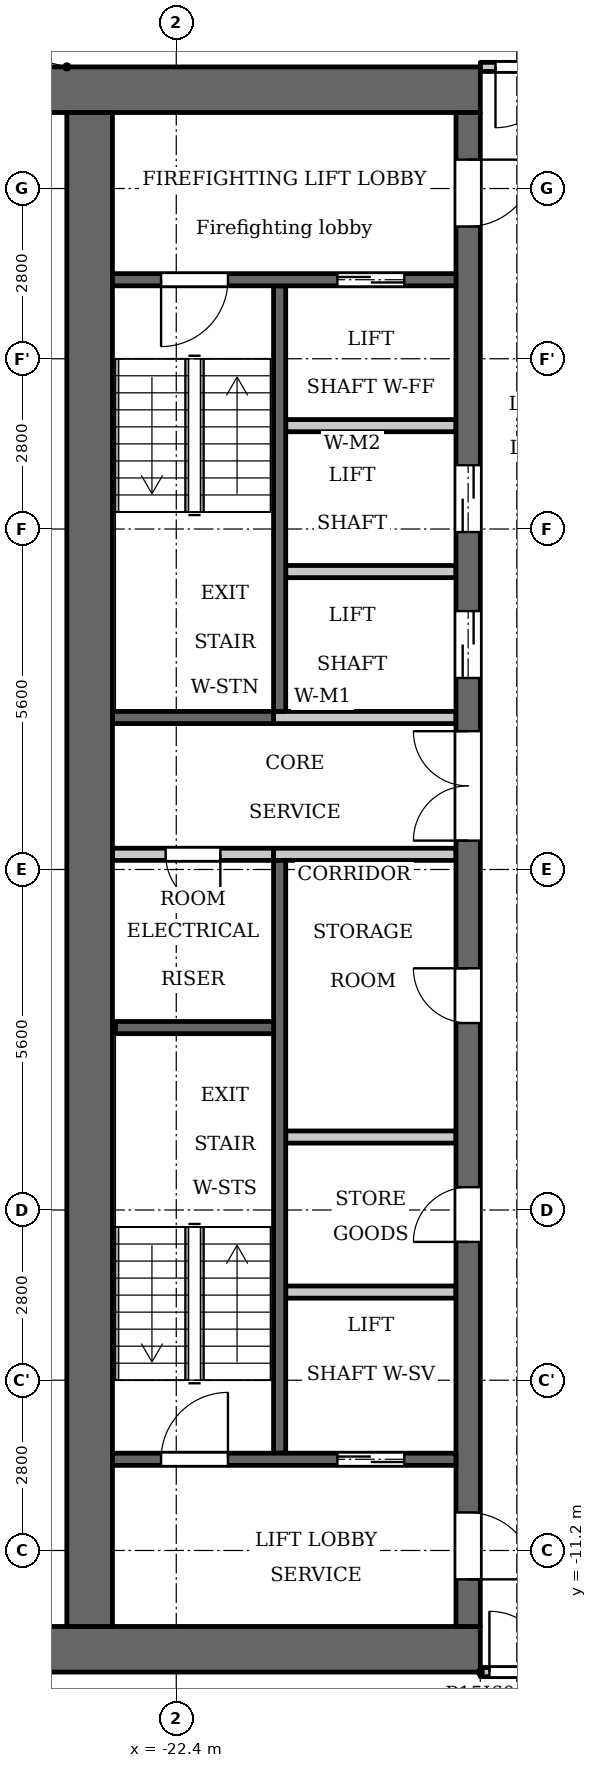
"""IFC4 building model, lengths in metres.
Left out: names, types, materials, properties, quantities, classifications, styles, units other than length and angle.
Written with IfcOpenShell. Run it as: python <this file> out.ifc"""

import sys

from ifc_helpers import new_model, si_unit, direction, frame, frame_2d, origin, place, context, subcontext, project, spatial, rectangle, extrude, element, fill, save


model = new_model("IFC4")
c1 = context("Model", 3, precision=1e-05, world=origin(), true_north=direction((0.0, 1.0)))
c2 = subcontext(c1, "Body", "Model", "MODEL_VIEW")
j1 = project(units=[si_unit("LENGTHUNIT", "METRE"), si_unit("PLANEANGLEUNIT", "RADIAN")], contexts=[c1])
p1 = place(None, origin())
s1 = spatial("IfcSite", under=j1, at=p1, CompositionType="ELEMENT")
p2 = place(p1, origin())
s2 = spatial("IfcBuilding", under=s1, at=p2, CompositionType="ELEMENT")
p3 = place(p2, frame((0.0, 0.0, 188.9)))
s3 = spatial("IfcBuildingStorey", under=s2, at=p3, CompositionType="ELEMENT", Elevation=188.9)
p4 = place(p3, frame((-20.7, 2.6, 0.0), z_axis=(0.0, 0.0, 1.0), x_axis=(0.0, 1.0, 0.0)))
e1 = element("IfcWall", 1, at=p4, inside=s3, PredefinedType="SHEAR", context=c2, shape_type="SweptSolid", body=[
    extrude(rectangle(XDim=7.0, YDim=0.2, at=frame_2d((3.5, 0.0))), origin(), (0.0, 0.0, 1.0), 3.2),
])
p5 = place(p3, frame((-20.7, -9.6, 0.0), z_axis=(0.0, 0.0, 1.0), x_axis=(0.0, 1.0, 0.0)))
e2 = element("IfcWall", 2, at=p5, inside=s3, PredefinedType="SHEAR", context=c2, shape_type="SweptSolid", body=[
    extrude(rectangle(XDim=9.75, YDim=0.2, at=frame_2d((4.875, 0.0))), origin(), (0.0, 0.0, 1.0), 3.2),
])
p6 = place(p3, frame((-20.8, 2.5, 0.0), z_axis=(0.0, 0.0, 1.0), x_axis=(-1.0, 0.0, 0.0)))
e3 = element("IfcWall", 3, at=p6, inside=s3, PredefinedType="SHEAR", context=c2, shape_type="SweptSolid", body=[
    extrude(rectangle(XDim=2.65, YDim=0.2, at=frame_2d((1.325, 0.0))), origin(), (0.0, 0.0, 1.0), 3.2),
])
p7 = place(p3, frame((-20.8, 0.25, 0.0), z_axis=(0.0, 0.0, 1.0), x_axis=(-1.0, 0.0, 0.0)))
e4 = element("IfcWall", 4, at=p7, inside=s3, PredefinedType="PARTITIONING", context=c2, shape_type="SweptSolid", body=[
    extrude(rectangle(XDim=2.65, YDim=0.2, at=frame_2d((1.325, 0.0))), origin(), (0.0, 0.0, 1.0), 3.2),
])
p8 = place(p7, frame((0.875, 0.0, 0.0)))
e5 = element("IfcOpeningElement", 5, at=p8, cuts=e4, PredefinedType="OPENING", context=c2, shape_type="SweptSolid", body=[
    extrude(rectangle(XDim=0.9, YDim=2.1, at=frame_2d((0.45, 1.05))), frame((0.0, 0.11, 0.0), z_axis=(0.0, -1.0, 0.0), x_axis=(1.0, 0.0, 0.0)), (0.0, 0.0, 1.0), 0.22),
])
for number, where, z_axis, x_axis in (
    (6, (-17.4, 12.825, 0.0), (0.0, 0.0, 1.0), (-1.0, 0.0, 0.0)),
    (7, (-17.4, -12.825, 0.0), (0.0, 0.0, 1.0), (-1.0, 0.0, 0.0)),
):
    element("IfcWall", number, at=place(p3, frame(where, z_axis=z_axis, x_axis=x_axis)), inside=s3, PredefinedType="SHEAR", context=c2, shape_type="SweptSolid", body=[
        extrude(rectangle(XDim=7.6, YDim=0.75, at=frame_2d((3.8, 0.0))), origin(), (0.0, 0.0, 1.0), 3.2),
    ])
p9 = place(p3, frame((-17.8, -4.4, 0.0), z_axis=(0.0, 0.0, 1.0), x_axis=(-1.0, 0.0, 0.0)))
e8 = element("IfcWall", 8, at=p9, inside=s3, PredefinedType="PARTITIONING", context=c2, shape_type="SweptSolid", body=[
    extrude(rectangle(XDim=2.8, YDim=0.2, at=frame_2d((1.4, 0.0))), origin(), (0.0, 0.0, 1.0), 3.2),
])
p10 = place(p3, frame((-17.6, -12.45, 0.0), z_axis=(0.0, 0.0, 1.0), x_axis=(0.0, 1.0, 0.0)))
e9 = element("IfcWall", 9, at=p10, inside=s3, PredefinedType="SHEAR", context=c2, shape_type="SweptSolid", body=[
    extrude(rectangle(XDim=24.9, YDim=0.4, at=frame_2d((12.45, 0.0))), origin(), (0.0, 0.0, 1.0), 3.2),
])
p11 = place(p10, frame((6.325, 0.0, 0.0)))
e10 = element("IfcOpeningElement", 10, at=p11, cuts=e9, PredefinedType="OPENING", context=c2, shape_type="SweptSolid", body=[
    extrude(rectangle(XDim=0.9, YDim=2.1, at=frame_2d((0.45, 1.05))), frame((0.0, 0.21, 0.0), z_axis=(0.0, -1.0, 0.0), x_axis=(1.0, 0.0, 0.0)), (0.0, 0.0, 1.0), 0.42),
])
p12 = place(p10, frame((9.925, 0.0, 0.0)))
e11 = element("IfcOpeningElement", 11, at=p12, cuts=e9, PredefinedType="OPENING", context=c2, shape_type="SweptSolid", body=[
    extrude(rectangle(XDim=0.9, YDim=2.1, at=frame_2d((0.45, 1.05))), frame((0.0, 0.21, 0.0), z_axis=(0.0, -1.0, 0.0), x_axis=(1.0, 0.0, 0.0)), (0.0, 0.0, 1.0), 0.42),
])
p13 = place(p10, frame((15.6, 0.0, 0.0)))
e12 = element("IfcOpeningElement", 12, at=p13, cuts=e9, PredefinedType="OPENING", context=c2, shape_type="SweptSolid", body=[
    extrude(rectangle(XDim=1.1, YDim=2.1, at=frame_2d((0.55, 1.05))), frame((0.0, 0.21, 0.0), z_axis=(0.0, -1.0, 0.0), x_axis=(1.0, 0.0, 0.0)), (0.0, 0.0, 1.0), 0.42),
])
p14 = place(p10, frame((18.0, 0.0, 0.0)))
e13 = element("IfcOpeningElement", 13, at=p14, cuts=e9, PredefinedType="OPENING", context=c2, shape_type="SweptSolid", body=[
    extrude(rectangle(XDim=1.1, YDim=2.1, at=frame_2d((0.55, 1.05))), frame((0.0, 0.21, 0.0), z_axis=(0.0, -1.0, 0.0), x_axis=(1.0, 0.0, 0.0)), (0.0, 0.0, 1.0), 0.42),
])
p15 = place(p10, frame((23.025, 0.0, 0.0)))
e14 = element("IfcOpeningElement", 14, at=p15, cuts=e9, PredefinedType="OPENING", context=c2, shape_type="SweptSolid", body=[
    extrude(rectangle(XDim=1.1, YDim=2.1, at=frame_2d((0.55, 1.05))), frame((0.0, 0.21, 0.0), z_axis=(0.0, -1.0, 0.0), x_axis=(1.0, 0.0, 0.0)), (0.0, 0.0, 1.0), 0.42),
])
p16 = place(p10, frame((0.775, 0.0, 0.0)))
e15 = element("IfcOpeningElement", 15, at=p16, cuts=e9, PredefinedType="OPENING", context=c2, shape_type="SweptSolid", body=[
    extrude(rectangle(XDim=1.1, YDim=2.1, at=frame_2d((0.55, 1.05))), frame((0.0, 0.21, 0.0), z_axis=(0.0, -1.0, 0.0), x_axis=(1.0, 0.0, 0.0)), (0.0, 0.0, 1.0), 0.42),
])
p17 = place(p10, frame((12.925, 0.0, 0.0)))
e16 = element("IfcOpeningElement", 16, at=p17, cuts=e9, PredefinedType="OPENING", context=c2, shape_type="SweptSolid", body=[
    extrude(rectangle(XDim=1.8, YDim=2.1, at=frame_2d((0.9, 1.05))), frame((0.0, 0.21, 0.0), z_axis=(0.0, -1.0, 0.0), x_axis=(1.0, 0.0, 0.0)), (0.0, 0.0, 1.0), 0.42),
])
p18 = place(p3, frame((-23.825, -12.45, 0.0), z_axis=(0.0, 0.0, 1.0), x_axis=(0.0, 1.0, 0.0)))
e17 = element("IfcWall", 17, at=p18, inside=s3, PredefinedType="SHEAR", context=c2, shape_type="SweptSolid", body=[
    extrude(rectangle(XDim=24.9, YDim=0.75, at=frame_2d((12.45, 0.0))), origin(), (0.0, 0.0, 1.0), 3.2),
])
p19 = place(p3, frame((-17.8, -9.7, 0.0), z_axis=(0.0, 0.0, 1.0), x_axis=(-1.0, 0.0, 0.0)))
e18 = element("IfcWall", 18, at=p19, inside=s3, PredefinedType="SHEAR", context=c2, shape_type="SweptSolid", body=[
    extrude(rectangle(XDim=5.65, YDim=0.2, at=frame_2d((2.825, 0.0))), origin(), (0.0, 0.0, 1.0), 3.2),
])
p20 = place(p19, frame((0.85, 0.0, 0.0)))
e19 = element("IfcOpeningElement", 19, at=p20, cuts=e18, PredefinedType="OPENING", context=c2, shape_type="SweptSolid", body=[
    extrude(rectangle(XDim=1.1, YDim=2.1, at=frame_2d((0.55, 1.05))), frame((0.0, 0.11, 0.0), z_axis=(0.0, -1.0, 0.0), x_axis=(1.0, 0.0, 0.0)), (0.0, 0.0, 1.0), 0.22),
])
p21 = place(p19, frame((3.75, 0.0, 0.0)))
e20 = element("IfcOpeningElement", 20, at=p21, cuts=e18, PredefinedType="OPENING", context=c2, shape_type="SweptSolid", body=[
    extrude(rectangle(XDim=1.1, YDim=2.1, at=frame_2d((0.55, 1.05))), frame((0.0, 0.11, 0.0), z_axis=(0.0, -1.0, 0.0), x_axis=(1.0, 0.0, 0.0)), (0.0, 0.0, 1.0), 0.22),
])
p22 = place(p3, frame((-17.8, -6.95, 0.0), z_axis=(0.0, 0.0, 1.0), x_axis=(-1.0, 0.0, 0.0)))
e21 = element("IfcWall", 21, at=p22, inside=s3, PredefinedType="PARTITIONING", context=c2, shape_type="SweptSolid", body=[
    extrude(rectangle(XDim=2.8, YDim=0.2, at=frame_2d((1.4, 0.0))), origin(), (0.0, 0.0, 1.0), 3.2),
])
for number, where, z_axis, x_axis in (
    (22, (-17.8, 0.25, 0.0), (0.0, 0.0, 1.0), (-1.0, 0.0, 0.0)),
    (23, (-17.8, 2.5, 0.0), (0.0, 0.0, 1.0), (-1.0, 0.0, 0.0)),
):
    element("IfcWall", number, at=place(p3, frame(where, z_axis=z_axis, x_axis=x_axis)), inside=s3, PredefinedType="PARTITIONING", context=c2, shape_type="SweptSolid", body=[
        extrude(rectangle(XDim=3.0, YDim=0.2, at=frame_2d((1.5, 0.0))), origin(), (0.0, 0.0, 1.0), 3.2),
    ])
for number, where, z_axis, x_axis in (
    (24, (-17.8, 4.9, 0.0), (0.0, 0.0, 1.0), (-1.0, 0.0, 0.0)),
    (25, (-17.8, 7.3, 0.0), (0.0, 0.0, 1.0), (-1.0, 0.0, 0.0)),
):
    element("IfcWall", number, at=place(p3, frame(where, z_axis=z_axis, x_axis=x_axis)), inside=s3, PredefinedType="PARTITIONING", context=c2, shape_type="SweptSolid", body=[
        extrude(rectangle(XDim=2.8, YDim=0.2, at=frame_2d((1.4, 0.0))), origin(), (0.0, 0.0, 1.0), 3.2),
    ])
p23 = place(p3, frame((-17.8, 9.7, 0.0), z_axis=(0.0, 0.0, 1.0), x_axis=(-1.0, 0.0, 0.0)))
e26 = element("IfcWall", 26, at=p23, inside=s3, PredefinedType="SHEAR", context=c2, shape_type="SweptSolid", body=[
    extrude(rectangle(XDim=5.65, YDim=0.2, at=frame_2d((2.825, 0.0))), origin(), (0.0, 0.0, 1.0), 3.2),
])
p24 = place(p23, frame((0.85, 0.0, 0.0)))
e27 = element("IfcOpeningElement", 27, at=p24, cuts=e26, PredefinedType="OPENING", context=c2, shape_type="SweptSolid", body=[
    extrude(rectangle(XDim=1.1, YDim=2.1, at=frame_2d((0.55, 1.05))), frame((0.0, 0.11, 0.0), z_axis=(0.0, -1.0, 0.0), x_axis=(1.0, 0.0, 0.0)), (0.0, 0.0, 1.0), 0.22),
])
p25 = place(p23, frame((3.75, 0.0, 0.0)))
e28 = element("IfcOpeningElement", 28, at=p25, cuts=e26, PredefinedType="OPENING", context=c2, shape_type="SweptSolid", body=[
    extrude(rectangle(XDim=1.1, YDim=2.1, at=frame_2d((0.55, 1.05))), frame((0.0, 0.11, 0.0), z_axis=(0.0, -1.0, 0.0), x_axis=(1.0, 0.0, 0.0)), (0.0, 0.0, 1.0), 0.22),
])
p26 = place(p3, frame((-20.8, -2.6, 0.0), z_axis=(0.0, 0.0, 1.0), x_axis=(-1.0, 0.0, 0.0)))
e29 = element("IfcWall", 29, at=p26, inside=s3, PredefinedType="SHEAR", context=c2, shape_type="SweptSolid", body=[
    extrude(rectangle(XDim=2.6, YDim=0.2, at=frame_2d((1.3, 0.0))), origin(), (0.0, 0.0, 1.0), 3.2),
])
p27 = place(p3, frame((-17.4, -13.2, 0.0), z_axis=(0.0, 0.0, 1.0), x_axis=(1.0, 0.0, 0.0)))
e30 = element("IfcWall", 30, at=p27, inside=s3, PredefinedType="PARTITIONING", context=c2, shape_type="SweptSolid", body=[
    extrude(rectangle(XDim=34.8, YDim=0.15, at=frame_2d((17.4, 0.0))), origin(), (0.0, 0.0, 1.0), 3.2),
])
p28 = place(p27, frame((0.15, 0.0, 0.0)))
e31 = element("IfcOpeningElement", 31, at=p28, cuts=e30, PredefinedType="OPENING", context=c2, shape_type="SweptSolid", body=[
    extrude(rectangle(XDim=1.0, YDim=2.1, at=frame_2d((0.5, 1.05))), frame((0.0, 0.085, 0.0), z_axis=(0.0, -1.0, 0.0), x_axis=(1.0, 0.0, 0.0)), (0.0, 0.0, 1.0), 0.17),
])
p29 = place(p27, frame((33.55, 0.0, 0.0)))
e32 = element("IfcOpeningElement", 32, at=p29, cuts=e30, PredefinedType="OPENING", context=c2, shape_type="SweptSolid", body=[
    extrude(rectangle(XDim=1.0, YDim=2.1, at=frame_2d((0.5, 1.05))), frame((0.0, 0.085, 0.0), z_axis=(0.0, -1.0, 0.0), x_axis=(1.0, 0.0, 0.0)), (0.0, 0.0, 1.0), 0.17),
])
p30 = place(p27, frame((15.7, 0.0, 0.0)))
e33 = element("IfcOpeningElement", 33, at=p30, cuts=e30, PredefinedType="OPENING", context=c2, shape_type="SweptSolid", body=[
    extrude(rectangle(XDim=1.0, YDim=2.1, at=frame_2d((0.5, 1.05))), frame((0.0, 0.085, 0.0), z_axis=(0.0, -1.0, 0.0), x_axis=(1.0, 0.0, 0.0)), (0.0, 0.0, 1.0), 0.17),
])
p31 = place(p27, frame((26.9, 0.0, 0.0)))
e34 = element("IfcOpeningElement", 34, at=p31, cuts=e30, PredefinedType="OPENING", context=c2, shape_type="SweptSolid", body=[
    extrude(rectangle(XDim=1.0, YDim=2.1, at=frame_2d((0.5, 1.05))), frame((0.0, 0.085, 0.0), z_axis=(0.0, -1.0, 0.0), x_axis=(1.0, 0.0, 0.0)), (0.0, 0.0, 1.0), 0.17),
])
p32 = place(p3, frame((-17.4, 13.2, 0.0), z_axis=(0.0, 0.0, 1.0), x_axis=(1.0, 0.0, 0.0)))
e35 = element("IfcWall", 35, at=p32, inside=s3, PredefinedType="PARTITIONING", context=c2, shape_type="SweptSolid", body=[
    extrude(rectangle(XDim=34.8, YDim=0.15, at=frame_2d((17.4, 0.0))), origin(), (0.0, 0.0, 1.0), 3.2),
])
p33 = place(p32, frame((0.25, 0.0, 0.0)))
e36 = element("IfcOpeningElement", 36, at=p33, cuts=e35, PredefinedType="OPENING", context=c2, shape_type="SweptSolid", body=[
    extrude(rectangle(XDim=1.0, YDim=2.1, at=frame_2d((0.5, 1.05))), frame((0.0, 0.085, 0.0), z_axis=(0.0, -1.0, 0.0), x_axis=(1.0, 0.0, 0.0)), (0.0, 0.0, 1.0), 0.17),
])
p34 = place(p32, frame((33.65, 0.0, 0.0)))
e37 = element("IfcOpeningElement", 37, at=p34, cuts=e35, PredefinedType="OPENING", context=c2, shape_type="SweptSolid", body=[
    extrude(rectangle(XDim=1.0, YDim=2.1, at=frame_2d((0.5, 1.05))), frame((0.0, 0.085, 0.0), z_axis=(0.0, -1.0, 0.0), x_axis=(1.0, 0.0, 0.0)), (0.0, 0.0, 1.0), 0.17),
])
p35 = place(p32, frame((10.15, 0.0, 0.0)))
e38 = element("IfcOpeningElement", 38, at=p35, cuts=e35, PredefinedType="OPENING", context=c2, shape_type="SweptSolid", body=[
    extrude(rectangle(XDim=1.0, YDim=2.1, at=frame_2d((0.5, 1.05))), frame((0.0, 0.085, 0.0), z_axis=(0.0, -1.0, 0.0), x_axis=(1.0, 0.0, 0.0)), (0.0, 0.0, 1.0), 0.17),
])
p36 = place(p32, frame((13.55, 0.0, 0.0)))
e39 = element("IfcOpeningElement", 39, at=p36, cuts=e35, PredefinedType="OPENING", context=c2, shape_type="SweptSolid", body=[
    extrude(rectangle(XDim=1.0, YDim=2.1, at=frame_2d((0.5, 1.05))), frame((0.0, 0.085, 0.0), z_axis=(0.0, -1.0, 0.0), x_axis=(1.0, 0.0, 0.0)), (0.0, 0.0, 1.0), 0.17),
])
p37 = place(p32, frame((20.85, 0.0, 0.0)))
e40 = element("IfcOpeningElement", 40, at=p37, cuts=e35, PredefinedType="OPENING", context=c2, shape_type="SweptSolid", body=[
    extrude(rectangle(XDim=1.0, YDim=2.1, at=frame_2d((0.5, 1.05))), frame((0.0, 0.085, 0.0), z_axis=(0.0, -1.0, 0.0), x_axis=(1.0, 0.0, 0.0)), (0.0, 0.0, 1.0), 0.17),
])
p38 = place(p32, frame((23.7, 0.0, 0.0)))
e41 = element("IfcOpeningElement", 41, at=p38, cuts=e35, PredefinedType="OPENING", context=c2, shape_type="SweptSolid", body=[
    extrude(rectangle(XDim=1.0, YDim=2.1, at=frame_2d((0.5, 1.05))), frame((0.0, 0.085, 0.0), z_axis=(0.0, -1.0, 0.0), x_axis=(1.0, 0.0, 0.0)), (0.0, 0.0, 1.0), 0.17),
])
p39 = place(p20, origin())
e42 = element("IfcDoor", 42, at=p39, inside=s3, OperationType="DOUBLE_DOOR_SLIDING", PredefinedType="DOOR", context=c2, shape_type="SweptSolid", body=[
    extrude(rectangle(XDim=1.1, YDim=2.1, at=frame_2d((0.55, 1.05))), frame((0.0, 0.025, 0.0), z_axis=(0.0, -1.0, 0.0), x_axis=(1.0, 0.0, 0.0)), (0.0, 0.0, 1.0), 0.05),
])
fill(e19, e42)
p40 = place(p11, origin())
e43 = element("IfcDoor", 43, at=p40, inside=s3, OperationType="SINGLE_SWING_RIGHT", PredefinedType="DOOR", context=c2, shape_type="SweptSolid", body=[
    extrude(rectangle(XDim=0.9, YDim=2.1, at=frame_2d((0.45, 1.05))), frame((0.0, 0.025, 0.0), z_axis=(0.0, -1.0, 0.0), x_axis=(1.0, 0.0, 0.0)), (0.0, 0.0, 1.0), 0.05),
])
fill(e10, e43)
p41 = place(p12, origin())
e44 = element("IfcDoor", 44, at=p41, inside=s3, OperationType="SINGLE_SWING_LEFT", PredefinedType="DOOR", context=c2, shape_type="SweptSolid", body=[
    extrude(rectangle(XDim=0.9, YDim=2.1, at=frame_2d((0.45, 1.05))), frame((0.0, 0.025, 0.0), z_axis=(0.0, -1.0, 0.0), x_axis=(1.0, 0.0, 0.0)), (0.0, 0.0, 1.0), 0.05),
])
fill(e11, e44)
p42 = place(p13, origin())
e45 = element("IfcDoor", 45, at=p42, inside=s3, OperationType="DOUBLE_DOOR_SLIDING", PredefinedType="DOOR", context=c2, shape_type="SweptSolid", body=[
    extrude(rectangle(XDim=1.1, YDim=2.1, at=frame_2d((0.55, 1.05))), frame((0.0, 0.025, 0.0), z_axis=(0.0, -1.0, 0.0), x_axis=(1.0, 0.0, 0.0)), (0.0, 0.0, 1.0), 0.05),
])
fill(e12, e45)
p43 = place(p14, origin())
e46 = element("IfcDoor", 46, at=p43, inside=s3, OperationType="DOUBLE_DOOR_SLIDING", PredefinedType="DOOR", context=c2, shape_type="SweptSolid", body=[
    extrude(rectangle(XDim=1.1, YDim=2.1, at=frame_2d((0.55, 1.05))), frame((0.0, 0.025, 0.0), z_axis=(0.0, -1.0, 0.0), x_axis=(1.0, 0.0, 0.0)), (0.0, 0.0, 1.0), 0.05),
])
fill(e13, e46)
p44 = place(p24, origin())
e47 = element("IfcDoor", 47, at=p44, inside=s3, OperationType="DOUBLE_DOOR_SLIDING", PredefinedType="DOOR", context=c2, shape_type="SweptSolid", body=[
    extrude(rectangle(XDim=1.1, YDim=2.1, at=frame_2d((0.55, 1.05))), frame((0.0, 0.025, 0.0), z_axis=(0.0, -1.0, 0.0), x_axis=(1.0, 0.0, 0.0)), (0.0, 0.0, 1.0), 0.05),
])
fill(e27, e47)
p45 = place(p15, origin())
e48 = element("IfcDoor", 48, at=p45, inside=s3, OperationType="SINGLE_SWING_RIGHT", PredefinedType="DOOR", context=c2, shape_type="SweptSolid", body=[
    extrude(rectangle(XDim=1.1, YDim=2.1, at=frame_2d((0.55, 1.05))), frame((0.0, 0.025, 0.0), z_axis=(0.0, -1.0, 0.0), x_axis=(1.0, 0.0, 0.0)), (0.0, 0.0, 1.0), 0.05),
])
fill(e14, e48)
p46 = place(p16, origin())
e49 = element("IfcDoor", 49, at=p46, inside=s3, OperationType="SINGLE_SWING_LEFT", PredefinedType="DOOR", context=c2, shape_type="SweptSolid", body=[
    extrude(rectangle(XDim=1.1, YDim=2.1, at=frame_2d((0.55, 1.05))), frame((0.0, 0.025, 0.0), z_axis=(0.0, -1.0, 0.0), x_axis=(1.0, 0.0, 0.0)), (0.0, 0.0, 1.0), 0.05),
])
fill(e15, e49)
p47 = place(p25, origin())
e50 = element("IfcDoor", 50, at=p47, inside=s3, OperationType="SINGLE_SWING_LEFT", PredefinedType="DOOR", context=c2, shape_type="SweptSolid", body=[
    extrude(rectangle(XDim=1.1, YDim=2.1, at=frame_2d((0.55, 1.05))), frame((0.0, 0.025, 0.0), z_axis=(0.0, -1.0, 0.0), x_axis=(1.0, 0.0, 0.0)), (0.0, 0.0, 1.0), 0.05),
])
fill(e28, e50)
p48 = place(p21, origin())
e51 = element("IfcDoor", 51, at=p48, inside=s3, OperationType="SINGLE_SWING_LEFT", PredefinedType="DOOR", context=c2, shape_type="SweptSolid", body=[
    extrude(rectangle(XDim=1.1, YDim=2.1, at=frame_2d((0.55, 1.05))), frame((0.0, 0.025, 0.0), z_axis=(0.0, -1.0, 0.0), x_axis=(1.0, 0.0, 0.0)), (0.0, 0.0, 1.0), 0.05),
])
fill(e20, e51)
p49 = place(p17, origin())
e52 = element("IfcDoor", 52, at=p49, inside=s3, OperationType="DOUBLE_DOOR_SINGLE_SWING", PredefinedType="DOOR", context=c2, shape_type="SweptSolid", body=[
    extrude(rectangle(XDim=1.8, YDim=2.1, at=frame_2d((0.9, 1.05))), frame((0.0, 0.025, 0.0), z_axis=(0.0, -1.0, 0.0), x_axis=(1.0, 0.0, 0.0)), (0.0, 0.0, 1.0), 0.05),
])
fill(e16, e52)
p50 = place(p8, origin())
e53 = element("IfcDoor", 53, at=p50, inside=s3, OperationType="SINGLE_SWING_RIGHT", PredefinedType="DOOR", context=c2, shape_type="SweptSolid", body=[
    extrude(rectangle(XDim=0.9, YDim=2.1, at=frame_2d((0.45, 1.05))), frame((0.0, 0.025, 0.0), z_axis=(0.0, -1.0, 0.0), x_axis=(1.0, 0.0, 0.0)), (0.0, 0.0, 1.0), 0.05),
])
fill(e5, e53)
p51 = place(p33, origin())
e54 = element("IfcDoor", 54, at=p51, inside=s3, OperationType="SINGLE_SWING_LEFT", PredefinedType="DOOR", context=c2, shape_type="SweptSolid", body=[
    extrude(rectangle(XDim=1.0, YDim=2.1, at=frame_2d((0.5, 1.05))), frame((0.0, 0.025, 0.0), z_axis=(0.0, -1.0, 0.0), x_axis=(1.0, 0.0, 0.0)), (0.0, 0.0, 1.0), 0.05),
])
fill(e36, e54)
p52 = place(p28, origin())
e55 = element("IfcDoor", 55, at=p52, inside=s3, OperationType="SINGLE_SWING_RIGHT", PredefinedType="DOOR", context=c2, shape_type="SweptSolid", body=[
    extrude(rectangle(XDim=1.0, YDim=2.1, at=frame_2d((0.5, 1.05))), frame((0.0, 0.025, 0.0), z_axis=(0.0, -1.0, 0.0), x_axis=(1.0, 0.0, 0.0)), (0.0, 0.0, 1.0), 0.05),
])
fill(e31, e55)
save(model, sys.argv[1])
